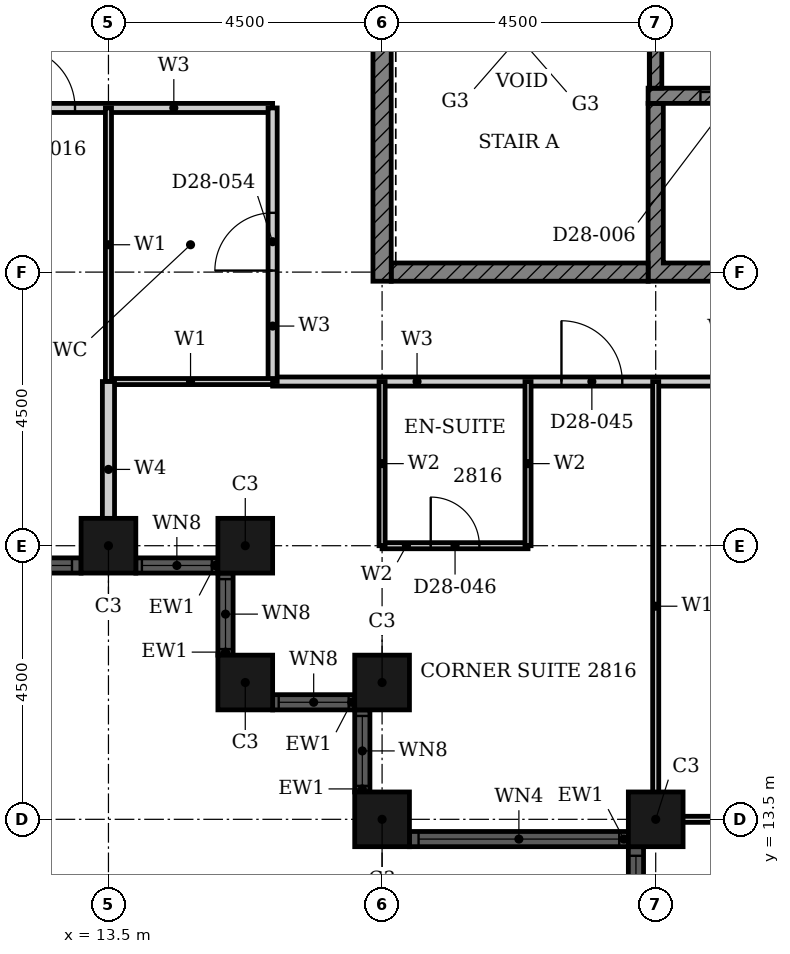
"""IFC4 building model, lengths in metres.
Left out: names, types, materials, properties, quantities, classifications, styles, units other than length and angle.
Written with IfcOpenShell. Run it as: python <this file> out.ifc"""

import sys

from ifc_helpers import new_model, si_unit, direction, frame, frame_2d, origin, origin_2d, place, context, subcontext, project, spatial, polyline, rectangle, hollow_rectangle, outline, extrude, element, fill, save


model = new_model("IFC4")
c1 = context("Model", 3, precision=1e-05, world=origin(), true_north=direction((0.0, 1.0)))
c2 = subcontext(c1, "Body", "Model", "MODEL_VIEW")
j1 = project(units=[si_unit("LENGTHUNIT", "METRE"), si_unit("PLANEANGLEUNIT", "RADIAN")], contexts=[c1])
p1 = place(None, origin())
s1 = spatial("IfcSite", under=j1, at=p1, CompositionType="ELEMENT")
p2 = place(p1, origin())
s2 = spatial("IfcBuilding", under=s1, at=p2, CompositionType="ELEMENT")
p3 = place(p2, frame((0.0, 0.0, 115.2)))
s3 = spatial("IfcBuildingStorey", under=s2, at=p3, CompositionType="ELEMENT", Elevation=115.2)
for number, where, z_axis, x_axis in (
    (1, (13.5, 18.0, 0.0), (0.0, 0.0, 1.0), (1.0, 0.0, 0.0)),
    (2, (15.75, 18.0, 0.0), (0.0, 0.0, 1.0), (1.0, 0.0, 0.0)),
    (3, (15.75, 15.75, 0.0), (0.0, 0.0, 1.0), (1.0, 0.0, 0.0)),
    (4, (18.0, 15.75, 0.0), (0.0, 0.0, 1.0), (1.0, 0.0, 0.0)),
    (5, (18.0, 13.5, 0.0), (0.0, 0.0, 1.0), (1.0, 0.0, 0.0)),
    (6, (22.5, 13.5, 0.0), (0.0, 0.0, 1.0), (1.0, 0.0, 0.0)),
):
    element("IfcColumn", number, at=place(p3, frame(where, z_axis=z_axis, x_axis=x_axis)), inside=s3, PredefinedType="COLUMN", context=c2, shape_type="SweptSolid", body=[
        extrude(hollow_rectangle(XDim=0.9, YDim=0.9, WallThickness=0.028, at=origin_2d()), origin(), (0.0, 0.0, 1.0), 3.6),
    ])
p4 = place(p3, frame((4.95, 17.675, 0.0), z_axis=(0.0, 0.0, 1.0), x_axis=(1.0, 0.0, 0.0)))
e7 = element("IfcWall", 7, at=p4, inside=s3, PredefinedType="SOLIDWALL", context=c2, shape_type="SweptSolid", body=[
    extrude(rectangle(XDim=8.1, YDim=0.25, at=frame_2d((4.05, 0.0))), origin(), (0.0, 0.0, 1.0), 3.6),
])
p5 = place(p4, frame((0.15, 0.0, 0.9)))
e8 = element("IfcOpeningElement", 8, at=p5, cuts=e7, PredefinedType="OPENING", context=c2, shape_type="SweptSolid", body=[
    extrude(rectangle(XDim=3.3, YDim=2.08, at=frame_2d((1.65, 1.04))), frame((0.0, 0.135, 0.0), z_axis=(0.0, -1.0, 0.0), x_axis=(1.0, 0.0, 0.0)), (0.0, 0.0, 1.0), 0.27),
])
p6 = place(p4, frame((4.65, 0.0, 0.9)))
e9 = element("IfcOpeningElement", 9, at=p6, cuts=e7, PredefinedType="OPENING", context=c2, shape_type="SweptSolid", body=[
    extrude(rectangle(XDim=3.3, YDim=2.08, at=frame_2d((1.65, 1.04))), frame((0.0, 0.135, 0.0), z_axis=(0.0, -1.0, 0.0), x_axis=(1.0, 0.0, 0.0)), (0.0, 0.0, 1.0), 0.27),
])
p7 = place(p3, frame((13.95, 17.675, 0.0), z_axis=(0.0, 0.0, 1.0), x_axis=(1.0, 0.0, 0.0)))
e10 = element("IfcWall", 10, at=p7, inside=s3, PredefinedType="SOLIDWALL", context=c2, shape_type="SweptSolid", body=[
    extrude(rectangle(XDim=1.35, YDim=0.25, at=frame_2d((0.675, 0.0))), origin(), (0.0, 0.0, 1.0), 3.6),
])
p8 = place(p7, frame((0.1, 0.0, 0.9)))
e11 = element("IfcOpeningElement", 11, at=p8, cuts=e10, PredefinedType="OPENING", context=c2, shape_type="SweptSolid", body=[
    extrude(rectangle(XDim=1.15, YDim=2.08, at=frame_2d((0.575, 1.04))), frame((0.0, 0.135, 0.0), z_axis=(0.0, -1.0, 0.0), x_axis=(1.0, 0.0, 0.0)), (0.0, 0.0, 1.0), 0.27),
])
p9 = place(p3, frame((15.425, 17.55, 0.0), z_axis=(0.0, 0.0, 1.0), x_axis=(0.0, -1.0, 0.0)))
e12 = element("IfcWall", 12, at=p9, inside=s3, PredefinedType="SOLIDWALL", context=c2, shape_type="SweptSolid", body=[
    extrude(rectangle(XDim=1.35, YDim=0.25, at=frame_2d((0.675, 0.0))), origin(), (0.0, 0.0, 1.0), 3.6),
])
p10 = place(p9, frame((0.1, 0.0, 0.9)))
e13 = element("IfcOpeningElement", 13, at=p10, cuts=e12, PredefinedType="OPENING", context=c2, shape_type="SweptSolid", body=[
    extrude(rectangle(XDim=1.15, YDim=2.08, at=frame_2d((0.575, 1.04))), frame((0.0, 0.135, 0.0), z_axis=(0.0, -1.0, 0.0), x_axis=(1.0, 0.0, 0.0)), (0.0, 0.0, 1.0), 0.27),
])
p11 = place(p3, frame((16.2, 15.425, 0.0), z_axis=(0.0, 0.0, 1.0), x_axis=(1.0, 0.0, 0.0)))
e14 = element("IfcWall", 14, at=p11, inside=s3, PredefinedType="SOLIDWALL", context=c2, shape_type="SweptSolid", body=[
    extrude(rectangle(XDim=1.35, YDim=0.25, at=frame_2d((0.675, 0.0))), origin(), (0.0, 0.0, 1.0), 3.6),
])
p12 = place(p11, frame((0.1, 0.0, 0.9)))
e15 = element("IfcOpeningElement", 15, at=p12, cuts=e14, PredefinedType="OPENING", context=c2, shape_type="SweptSolid", body=[
    extrude(rectangle(XDim=1.15, YDim=2.08, at=frame_2d((0.575, 1.04))), frame((0.0, 0.135, 0.0), z_axis=(0.0, -1.0, 0.0), x_axis=(1.0, 0.0, 0.0)), (0.0, 0.0, 1.0), 0.27),
])
p13 = place(p3, frame((17.675, 15.3, 0.0), z_axis=(0.0, 0.0, 1.0), x_axis=(0.0, -1.0, 0.0)))
e16 = element("IfcWall", 16, at=p13, inside=s3, PredefinedType="SOLIDWALL", context=c2, shape_type="SweptSolid", body=[
    extrude(rectangle(XDim=1.35, YDim=0.25, at=frame_2d((0.675, 0.0))), origin(), (0.0, 0.0, 1.0), 3.6),
])
p14 = place(p13, frame((0.1, 0.0, 0.9)))
e17 = element("IfcOpeningElement", 17, at=p14, cuts=e16, PredefinedType="OPENING", context=c2, shape_type="SweptSolid", body=[
    extrude(rectangle(XDim=1.15, YDim=2.08, at=frame_2d((0.575, 1.04))), frame((0.0, 0.135, 0.0), z_axis=(0.0, -1.0, 0.0), x_axis=(1.0, 0.0, 0.0)), (0.0, 0.0, 1.0), 0.27),
])
p15 = place(p3, frame((18.45, 13.175, 0.0), z_axis=(0.0, 0.0, 1.0), x_axis=(1.0, 0.0, 0.0)))
e18 = element("IfcWall", 18, at=p15, inside=s3, PredefinedType="SOLIDWALL", context=c2, shape_type="SweptSolid", body=[
    extrude(rectangle(XDim=3.6, YDim=0.25, at=frame_2d((1.8, 0.0))), origin(), (0.0, 0.0, 1.0), 3.6),
])
p16 = place(p15, frame((0.15, 0.0, 0.9)))
e19 = element("IfcOpeningElement", 19, at=p16, cuts=e18, PredefinedType="OPENING", context=c2, shape_type="SweptSolid", body=[
    extrude(rectangle(XDim=3.3, YDim=2.08, at=frame_2d((1.65, 1.04))), frame((0.0, 0.135, 0.0), z_axis=(0.0, -1.0, 0.0), x_axis=(1.0, 0.0, 0.0)), (0.0, 0.0, 1.0), 0.27),
])
p17 = place(p3, frame((22.175, 13.05, 0.0), z_axis=(0.0, 0.0, 1.0), x_axis=(0.0, -1.0, 0.0)))
e20 = element("IfcWall", 20, at=p17, inside=s3, PredefinedType="SOLIDWALL", context=c2, shape_type="SweptSolid", body=[
    extrude(rectangle(XDim=8.1, YDim=0.25, at=frame_2d((4.05, 0.0))), origin(), (0.0, 0.0, 1.0), 3.6),
])
p18 = place(p17, frame((0.15, 0.0, 0.9)))
e21 = element("IfcOpeningElement", 21, at=p18, cuts=e20, PredefinedType="OPENING", context=c2, shape_type="SweptSolid", body=[
    extrude(rectangle(XDim=3.3, YDim=2.08, at=frame_2d((1.65, 1.04))), frame((0.0, 0.135, 0.0), z_axis=(0.0, -1.0, 0.0), x_axis=(1.0, 0.0, 0.0)), (0.0, 0.0, 1.0), 0.27),
])
p19 = place(p17, frame((4.65, 0.0, 0.9)))
e22 = element("IfcOpeningElement", 22, at=p19, cuts=e20, PredefinedType="OPENING", context=c2, shape_type="SweptSolid", body=[
    extrude(rectangle(XDim=3.3, YDim=2.08, at=frame_2d((1.65, 1.04))), frame((0.0, 0.135, 0.0), z_axis=(0.0, -1.0, 0.0), x_axis=(1.0, 0.0, 0.0)), (0.0, 0.0, 1.0), 0.27),
])
p20 = place(p3, origin())
e23 = element("IfcWall", 23, at=p20, inside=s3, PredefinedType="SHEAR", context=c2, shape_type="SweptSolid", body=[
    extrude(outline(polyline([(22.375, 22.35), (38.053, 22.35), (38.053, 25.275), (37.803, 25.275), (37.803, 22.65), (35.482, 22.65), (35.482, 25.275), (35.232, 25.275), (35.232, 22.65), (32.911, 22.65), (32.911, 25.275), (32.661, 25.275), (32.661, 22.65), (30.339, 22.65), (30.339, 25.275), (30.089, 25.275), (30.089, 22.65), (27.768, 22.65), (27.768, 25.275), (27.518, 25.275), (27.518, 22.65), (25.197, 22.65), (25.197, 25.275), (24.947, 25.275), (24.947, 22.65), (22.625, 22.65), (22.625, 25.275), (22.375, 25.275), (22.375, 22.35)])), origin(), (0.0, 0.0, 1.0), 3.3),
])
p21 = place(p3, frame((18.15, 22.5, 0.0), z_axis=(0.0, 0.0, 1.0), x_axis=(1.0, 0.0, 0.0)))
e24 = element("IfcWall", 24, at=p21, inside=s3, PredefinedType="SHEAR", context=c2, shape_type="SweptSolid", body=[
    extrude(rectangle(XDim=4.225, YDim=0.3, at=frame_2d((2.113, 0.0))), origin(), (0.0, 0.0, 1.0), 3.3),
])
p22 = place(p3, frame((18.0, 22.35, 0.0), z_axis=(0.0, 0.0, 1.0), x_axis=(0.0, 1.0, 0.0)))
e25 = element("IfcWall", 25, at=p22, inside=s3, PredefinedType="SHEAR", context=c2, shape_type="SweptSolid", body=[
    extrude(rectangle(XDim=9.3, YDim=0.3, at=frame_2d((4.65, 0.0))), origin(), (0.0, 0.0, 1.0), 3.3),
])
p23 = place(p3, frame((22.375, 25.4, 0.0), z_axis=(0.0, 0.0, 1.0), x_axis=(1.0, 0.0, 0.0)))
e26 = element("IfcWall", 26, at=p23, inside=s3, PredefinedType="SHEAR", context=c2, shape_type="SweptSolid", body=[
    extrude(rectangle(XDim=15.678, YDim=0.25, at=frame_2d((7.839, 0.0))), origin(), (0.0, 0.0, 1.0), 3.3),
])
p24 = place(p23, frame((3.432, 0.0, 0.0)))
e27 = element("IfcOpeningElement", 27, at=p24, cuts=e26, PredefinedType="OPENING", context=c2, shape_type="SweptSolid", body=[
    extrude(rectangle(XDim=1.1, YDim=2.1, at=frame_2d((0.55, 1.05))), frame((0.0, 0.135, 0.0), z_axis=(0.0, -1.0, 0.0), x_axis=(1.0, 0.0, 0.0)), (0.0, 0.0, 1.0), 0.27),
])
p25 = place(p23, frame((11.146, 0.0, 0.0)))
e28 = element("IfcOpeningElement", 28, at=p25, cuts=e26, PredefinedType="OPENING", context=c2, shape_type="SweptSolid", body=[
    extrude(rectangle(XDim=1.1, YDim=2.1, at=frame_2d((0.55, 1.05))), frame((0.0, 0.135, 0.0), z_axis=(0.0, -1.0, 0.0), x_axis=(1.0, 0.0, 0.0)), (0.0, 0.0, 1.0), 0.27),
])
p26 = place(p23, frame((13.718, 0.0, 0.0)))
e29 = element("IfcOpeningElement", 29, at=p26, cuts=e26, PredefinedType="OPENING", context=c2, shape_type="SweptSolid", body=[
    extrude(rectangle(XDim=1.1, YDim=2.1, at=frame_2d((0.55, 1.05))), frame((0.0, 0.135, 0.0), z_axis=(0.0, -1.0, 0.0), x_axis=(1.0, 0.0, 0.0)), (0.0, 0.0, 1.0), 0.27),
])
p27 = place(p23, frame((0.861, 0.0, 0.0)))
e30 = element("IfcOpeningElement", 30, at=p27, cuts=e26, PredefinedType="OPENING", context=c2, shape_type="SweptSolid", body=[
    extrude(rectangle(XDim=1.1, YDim=2.1, at=frame_2d((0.55, 1.05))), frame((0.0, 0.135, 0.0), z_axis=(0.0, -1.0, 0.0), x_axis=(1.0, 0.0, 0.0)), (0.0, 0.0, 1.0), 0.27),
])
p28 = place(p3, frame((22.5, 31.35, 0.0), z_axis=(0.0, 0.0, 1.0), x_axis=(0.0, -1.0, 0.0)))
e31 = element("IfcWall", 31, at=p28, inside=s3, PredefinedType="SHEAR", context=c2, shape_type="SweptSolid", body=[
    extrude(rectangle(XDim=5.825, YDim=0.2, at=frame_2d((2.913, 0.0))), origin(), (0.0, 0.0, 1.0), 3.3),
])
p29 = place(p28, frame((0.25, 0.0, 0.0)))
e32 = element("IfcOpeningElement", 32, at=p29, cuts=e31, PredefinedType="OPENING", context=c2, shape_type="SweptSolid", body=[
    extrude(rectangle(XDim=1.8, YDim=2.1, at=frame_2d((0.9, 1.05))), frame((0.0, 0.11, 0.0), z_axis=(0.0, -1.0, 0.0), x_axis=(1.0, 0.0, 0.0)), (0.0, 0.0, 1.0), 0.22),
])
p30 = place(p3, frame((16.2, 20.7, 0.0), z_axis=(0.0, 0.0, 1.0), x_axis=(1.0, 0.0, 0.0)))
e33 = element("IfcWall", 33, at=p30, inside=s3, PredefinedType="PARTITIONING", context=c2, shape_type="SweptSolid", body=[
    extrude(rectangle(XDim=13.5, YDim=0.15, at=frame_2d((6.75, 0.0))), origin(), (0.0, 0.0, 1.0), 3.3),
])
p31 = place(p30, frame((4.75, 0.0, 0.0)))
e34 = element("IfcOpeningElement", 34, at=p31, cuts=e33, PredefinedType="OPENING", context=c2, shape_type="SweptSolid", body=[
    extrude(rectangle(XDim=1.0, YDim=2.1, at=frame_2d((0.5, 1.05))), frame((0.0, 0.085, 0.0), z_axis=(0.0, -1.0, 0.0), x_axis=(1.0, 0.0, 0.0)), (0.0, 0.0, 1.0), 0.17),
])
p32 = place(p30, frame((9.45, 0.0, 0.0)))
e35 = element("IfcOpeningElement", 35, at=p32, cuts=e33, PredefinedType="OPENING", context=c2, shape_type="SweptSolid", body=[
    extrude(rectangle(XDim=0.9, YDim=2.1, at=frame_2d((0.45, 1.05))), frame((0.0, 0.085, 0.0), z_axis=(0.0, -1.0, 0.0), x_axis=(1.0, 0.0, 0.0)), (0.0, 0.0, 1.0), 0.17),
])
p33 = place(p3, frame((9.0, 25.2, 0.0), z_axis=(0.0, 0.0, 1.0), x_axis=(1.0, 0.0, 0.0)))
e36 = element("IfcWall", 36, at=p33, inside=s3, PredefinedType="PARTITIONING", context=c2, shape_type="SweptSolid", body=[
    extrude(rectangle(XDim=7.2, YDim=0.15, at=frame_2d((3.6, 0.0))), origin(), (0.0, 0.0, 1.0), 3.3),
])
p34 = place(p33, frame((2.95, 0.0, 0.0)))
e37 = element("IfcOpeningElement", 37, at=p34, cuts=e36, PredefinedType="OPENING", context=c2, shape_type="SweptSolid", body=[
    extrude(rectangle(XDim=1.0, YDim=2.1, at=frame_2d((0.5, 1.05))), frame((0.0, 0.085, 0.0), z_axis=(0.0, -1.0, 0.0), x_axis=(1.0, 0.0, 0.0)), (0.0, 0.0, 1.0), 0.17),
])
p35 = place(p3, frame((16.2, 20.7, 0.0), z_axis=(0.0, 0.0, 1.0), x_axis=(0.0, 1.0, 0.0)))
e38 = element("IfcWall", 38, at=p35, inside=s3, PredefinedType="PARTITIONING", context=c2, shape_type="SweptSolid", body=[
    extrude(rectangle(XDim=4.5, YDim=0.15, at=frame_2d((2.25, 0.0))), origin(), (0.0, 0.0, 1.0), 3.3),
])
p36 = place(p35, frame((1.825, 0.0, 0.0)))
e39 = element("IfcOpeningElement", 39, at=p36, cuts=e38, PredefinedType="OPENING", context=c2, shape_type="SweptSolid", body=[
    extrude(rectangle(XDim=0.95, YDim=2.1, at=frame_2d((0.475, 1.05))), frame((0.0, 0.085, 0.0), z_axis=(0.0, -1.0, 0.0), x_axis=(1.0, 0.0, 0.0)), (0.0, 0.0, 1.0), 0.17),
])
p37 = place(p3, frame((22.31, 13.5, 0.0), z_axis=(0.0, 0.0, 1.0), x_axis=(1.0, 0.0, 0.0)))
e40 = element("IfcWall", 40, at=p37, inside=s3, PredefinedType="PARTITIONING", context=c2, shape_type="SweptSolid", body=[
    extrude(rectangle(XDim=7.39, YDim=0.1, at=frame_2d((3.695, 0.0))), origin(), (0.0, 0.0, 1.0), 2.38),
])
p38 = place(p3, frame((13.5, 20.7, 0.0), z_axis=(0.0, 0.0, 1.0), x_axis=(1.0, 0.0, 0.0)))
e41 = element("IfcWall", 41, at=p38, inside=s3, PredefinedType="PARTITIONING", context=c2, shape_type="SweptSolid", body=[
    extrude(rectangle(XDim=2.7, YDim=0.1, at=frame_2d((1.35, 0.0))), origin(), (0.0, 0.0, 1.0), 3.3),
])
p39 = place(p3, frame((13.5, 20.7, 0.0), z_axis=(0.0, 0.0, 1.0), x_axis=(0.0, 1.0, 0.0)))
e42 = element("IfcWall", 42, at=p39, inside=s3, PredefinedType="PARTITIONING", context=c2, shape_type="SweptSolid", body=[
    extrude(rectangle(XDim=4.5, YDim=0.1, at=frame_2d((2.25, 0.0))), origin(), (0.0, 0.0, 1.0), 2.38),
])
p40 = place(p3, frame((22.5, 13.31, 0.0), z_axis=(0.0, 0.0, 1.0), x_axis=(0.0, 1.0, 0.0)))
e43 = element("IfcWall", 43, at=p40, inside=s3, PredefinedType="PARTITIONING", context=c2, shape_type="SweptSolid", body=[
    extrude(rectangle(XDim=7.39, YDim=0.1, at=frame_2d((3.695, 0.0))), origin(), (0.0, 0.0, 1.0), 3.3),
])
p41 = place(p3, frame((13.5, 17.81, 0.0), z_axis=(0.0, 0.0, 1.0), x_axis=(0.0, 1.0, 0.0)))
e44 = element("IfcWall", 44, at=p41, inside=s3, PredefinedType="PARTITIONING", context=c2, shape_type="SweptSolid", body=[
    extrude(rectangle(XDim=2.89, YDim=0.2, at=frame_2d((1.445, 0.0))), origin(), (0.0, 0.0, 1.0), 2.38),
])
p42 = place(p3, frame((18.0, 18.0, 0.0), z_axis=(0.0, 0.0, 1.0), x_axis=(1.0, 0.0, 0.0)))
e45 = element("IfcWall", 45, at=p42, inside=s3, PredefinedType="PARTITIONING", context=c2, shape_type="SweptSolid", body=[
    extrude(rectangle(XDim=2.4, YDim=0.1, at=frame_2d((1.2, 0.0))), origin(), (0.0, 0.0, 1.0), 3.3),
])
p43 = place(p42, frame((0.8, 0.0, 0.0)))
e46 = element("IfcOpeningElement", 46, at=p43, cuts=e45, PredefinedType="OPENING", context=c2, shape_type="SweptSolid", body=[
    extrude(rectangle(XDim=0.8, YDim=2.1, at=frame_2d((0.4, 1.05))), frame((0.0, 0.06, 0.0), z_axis=(0.0, -1.0, 0.0), x_axis=(1.0, 0.0, 0.0)), (0.0, 0.0, 1.0), 0.12),
])
for number, where, z_axis, x_axis in (
    (47, (18.0, 18.0, 0.0), (0.0, 0.0, 1.0), (0.0, 1.0, 0.0)),
    (48, (20.4, 18.0, 0.0), (0.0, 0.0, 1.0), (0.0, 1.0, 0.0)),
):
    element("IfcWall", number, at=place(p3, frame(where, z_axis=z_axis, x_axis=x_axis)), inside=s3, PredefinedType="PARTITIONING", context=c2, shape_type="SweptSolid", body=[
        extrude(rectangle(XDim=2.7, YDim=0.1, at=frame_2d((1.35, 0.0))), origin(), (0.0, 0.0, 1.0), 3.3),
    ])
p44 = place(p6, origin())
e49 = element("IfcWindow", 49, at=p44, inside=s3, PartitioningType="SINGLE_PANEL", PredefinedType="WINDOW", context=c2, shape_type="SweptSolid", body=[
    extrude(rectangle(XDim=3.3, YDim=2.08, at=frame_2d((1.65, 1.04))), frame((0.0, 0.03, 0.0), z_axis=(0.0, -1.0, 0.0), x_axis=(1.0, 0.0, 0.0)), (0.0, 0.0, 1.0), 0.06),
])
fill(e9, e49)
p45 = place(p8, origin())
e50 = element("IfcWindow", 50, at=p45, inside=s3, PartitioningType="SINGLE_PANEL", PredefinedType="WINDOW", context=c2, shape_type="SweptSolid", body=[
    extrude(rectangle(XDim=1.15, YDim=2.08, at=frame_2d((0.575, 1.04))), frame((0.0, 0.03, 0.0), z_axis=(0.0, -1.0, 0.0), x_axis=(1.0, 0.0, 0.0)), (0.0, 0.0, 1.0), 0.06),
])
fill(e11, e50)
p46 = place(p10, origin())
e51 = element("IfcWindow", 51, at=p46, inside=s3, PartitioningType="SINGLE_PANEL", PredefinedType="WINDOW", context=c2, shape_type="SweptSolid", body=[
    extrude(rectangle(XDim=1.15, YDim=2.08, at=frame_2d((0.575, 1.04))), frame((0.0, 0.03, 0.0), z_axis=(0.0, -1.0, 0.0), x_axis=(1.0, 0.0, 0.0)), (0.0, 0.0, 1.0), 0.06),
])
fill(e13, e51)
p47 = place(p12, origin())
e52 = element("IfcWindow", 52, at=p47, inside=s3, PartitioningType="SINGLE_PANEL", PredefinedType="WINDOW", context=c2, shape_type="SweptSolid", body=[
    extrude(rectangle(XDim=1.15, YDim=2.08, at=frame_2d((0.575, 1.04))), frame((0.0, 0.03, 0.0), z_axis=(0.0, -1.0, 0.0), x_axis=(1.0, 0.0, 0.0)), (0.0, 0.0, 1.0), 0.06),
])
fill(e15, e52)
p48 = place(p14, origin())
e53 = element("IfcWindow", 53, at=p48, inside=s3, PartitioningType="SINGLE_PANEL", PredefinedType="WINDOW", context=c2, shape_type="SweptSolid", body=[
    extrude(rectangle(XDim=1.15, YDim=2.08, at=frame_2d((0.575, 1.04))), frame((0.0, 0.03, 0.0), z_axis=(0.0, -1.0, 0.0), x_axis=(1.0, 0.0, 0.0)), (0.0, 0.0, 1.0), 0.06),
])
fill(e17, e53)
p49 = place(p16, origin())
e54 = element("IfcWindow", 54, at=p49, inside=s3, PartitioningType="SINGLE_PANEL", PredefinedType="WINDOW", context=c2, shape_type="SweptSolid", body=[
    extrude(rectangle(XDim=3.3, YDim=2.08, at=frame_2d((1.65, 1.04))), frame((0.0, 0.03, 0.0), z_axis=(0.0, -1.0, 0.0), x_axis=(1.0, 0.0, 0.0)), (0.0, 0.0, 1.0), 0.06),
])
fill(e19, e54)
p50 = place(p18, origin())
e55 = element("IfcWindow", 55, at=p50, inside=s3, PartitioningType="SINGLE_PANEL", PredefinedType="WINDOW", context=c2, shape_type="SweptSolid", body=[
    extrude(rectangle(XDim=3.3, YDim=2.08, at=frame_2d((1.65, 1.04))), frame((0.0, 0.03, 0.0), z_axis=(0.0, -1.0, 0.0), x_axis=(1.0, 0.0, 0.0)), (0.0, 0.0, 1.0), 0.06),
])
fill(e21, e55)
p51 = place(p27, origin())
e56 = element("IfcDoor", 56, at=p51, inside=s3, OperationType="DOUBLE_DOOR_SLIDING", PredefinedType="DOOR", context=c2, shape_type="SweptSolid", body=[
    extrude(rectangle(XDim=1.1, YDim=2.1, at=frame_2d((0.55, 1.05))), frame((0.0, 0.025, 0.0), z_axis=(0.0, -1.0, 0.0), x_axis=(1.0, 0.0, 0.0)), (0.0, 0.0, 1.0), 0.05),
])
fill(e30, e56)
p52 = place(p34, origin())
e57 = element("IfcDoor", 57, at=p52, inside=s3, OperationType="SINGLE_SWING_RIGHT", PredefinedType="DOOR", context=c2, shape_type="SweptSolid", body=[
    extrude(rectangle(XDim=1.0, YDim=2.1, at=frame_2d((0.5, 1.05))), frame((0.0, 0.025, 0.0), z_axis=(0.0, -1.0, 0.0), x_axis=(1.0, 0.0, 0.0)), (0.0, 0.0, 1.0), 0.05),
])
fill(e37, e57)
p53 = place(p31, origin())
e58 = element("IfcDoor", 58, at=p53, inside=s3, OperationType="SINGLE_SWING_RIGHT", PredefinedType="DOOR", context=c2, shape_type="SweptSolid", body=[
    extrude(rectangle(XDim=1.0, YDim=2.1, at=frame_2d((0.5, 1.05))), frame((0.0, 0.025, 0.0), z_axis=(0.0, -1.0, 0.0), x_axis=(1.0, 0.0, 0.0)), (0.0, 0.0, 1.0), 0.05),
])
fill(e34, e58)
p54 = place(p43, origin())
e59 = element("IfcDoor", 59, at=p54, inside=s3, OperationType="SINGLE_SWING_RIGHT", PredefinedType="DOOR", context=c2, shape_type="SweptSolid", body=[
    extrude(rectangle(XDim=0.8, YDim=2.1, at=frame_2d((0.4, 1.05))), frame((0.0, 0.025, 0.0), z_axis=(0.0, -1.0, 0.0), x_axis=(1.0, 0.0, 0.0)), (0.0, 0.0, 1.0), 0.05),
])
fill(e46, e59)
p55 = place(p36, origin())
e60 = element("IfcDoor", 60, at=p55, inside=s3, OperationType="SINGLE_SWING_LEFT", PredefinedType="DOOR", context=c2, shape_type="SweptSolid", body=[
    extrude(rectangle(XDim=0.95, YDim=2.1, at=frame_2d((0.475, 1.05))), frame((0.0, 0.025, 0.0), z_axis=(0.0, -1.0, 0.0), x_axis=(1.0, 0.0, 0.0)), (0.0, 0.0, 1.0), 0.05),
])
fill(e39, e60)
save(model, sys.argv[1])
